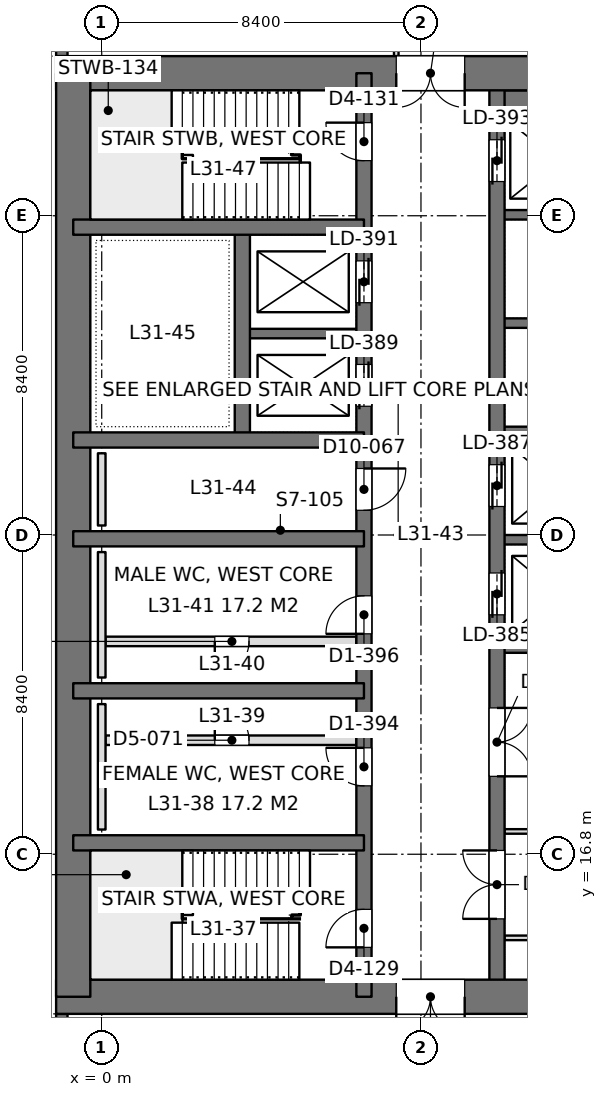
"""IFC4 building model, lengths in metres.
Left out: names, types, materials, properties, quantities, classifications, styles, units other than length and angle.
Written with IfcOpenShell. Run it as: python <this file> out.ifc"""

import sys

from ifc_helpers import new_model, si_unit, direction, frame, frame_2d, origin, place, context, subcontext, project, spatial, rectangle, extrude, element, fill, save


model = new_model("IFC4")
c1 = context("Model", 3, precision=1e-05, world=origin(), true_north=direction((0.0, 1.0)))
c2 = subcontext(c1, "Body", "Model", "MODEL_VIEW")
j1 = project(units=[si_unit("LENGTHUNIT", "METRE"), si_unit("PLANEANGLEUNIT", "RADIAN")], contexts=[c1])
p1 = place(None, origin())
s1 = spatial("IfcSite", under=j1, at=p1, CompositionType="ELEMENT")
p2 = place(p1, origin())
s2 = spatial("IfcBuilding", under=s1, at=p2, CompositionType="ELEMENT")
p3 = place(p2, frame((0.0, 0.0, 138.6)))
s3 = spatial("IfcBuildingStorey", under=s2, at=p3, CompositionType="ELEMENT", Elevation=138.6)
p4 = place(p3, frame((-1.2, 13.05, 0.0), z_axis=(0.0, 0.0, 1.0), x_axis=(1.0, 0.0, 0.0)))
e1 = element("IfcWall", 1, at=p4, inside=s3, PredefinedType="SHEAR", context=c2, shape_type="SweptSolid", body=[
    extrude(rectangle(XDim=18.0, YDim=0.9, at=frame_2d((9.0, 0.0))), origin(), (0.0, 0.0, 1.0), 4.2),
])
p5 = place(p4, frame((8.95, 0.0, 0.0)))
e2 = element("IfcOpeningElement", 2, at=p5, cuts=e1, PredefinedType="OPENING", context=c2, shape_type="SweptSolid", body=[
    extrude(rectangle(XDim=1.8, YDim=2.4, at=frame_2d((0.9, 1.2))), frame((0.0, 0.46, 0.0), z_axis=(0.0, -1.0, 0.0), x_axis=(1.0, 0.0, 0.0)), (0.0, 0.0, 1.0), 0.92),
])
p6 = place(p3, frame((-1.2, 37.35, 0.0), z_axis=(0.0, 0.0, 1.0), x_axis=(1.0, 0.0, 0.0)))
e3 = element("IfcWall", 3, at=p6, inside=s3, PredefinedType="SHEAR", context=c2, shape_type="SweptSolid", body=[
    extrude(rectangle(XDim=18.0, YDim=0.9, at=frame_2d((9.0, 0.0))), origin(), (0.0, 0.0, 1.0), 4.2),
])
p7 = place(p6, frame((8.95, 0.0, 0.0)))
e4 = element("IfcOpeningElement", 4, at=p7, cuts=e3, PredefinedType="OPENING", context=c2, shape_type="SweptSolid", body=[
    extrude(rectangle(XDim=1.8, YDim=2.4, at=frame_2d((0.9, 1.2))), frame((0.0, 0.46, 0.0), z_axis=(0.0, -1.0, 0.0), x_axis=(1.0, 0.0, 0.0)), (0.0, 0.0, 1.0), 0.92),
])
p8 = place(p3, frame((-0.75, 13.05, 0.0), z_axis=(0.0, 0.0, 1.0), x_axis=(0.0, 1.0, 0.0)))
e5 = element("IfcWall", 5, at=p8, inside=s3, PredefinedType="SHEAR", context=c2, shape_type="SweptSolid", body=[
    extrude(rectangle(XDim=24.3, YDim=0.9, at=frame_2d((12.15, 0.0))), origin(), (0.0, 0.0, 1.0), 4.2),
])
p9 = place(p3, frame((6.9, 13.05, 0.0), z_axis=(0.0, 0.0, 1.0), x_axis=(0.0, 1.0, 0.0)))
e6 = element("IfcWall", 6, at=p9, inside=s3, PredefinedType="SHEAR", context=c2, shape_type="SweptSolid", body=[
    extrude(rectangle(XDim=24.3, YDim=0.4, at=frame_2d((12.15, 0.0))), origin(), (0.0, 0.0, 1.0), 4.2),
])
p10 = place(p9, frame((1.3, 0.0, 0.0)))
e7 = element("IfcOpeningElement", 7, at=p10, cuts=e6, PredefinedType="OPENING", context=c2, shape_type="SweptSolid", body=[
    extrude(rectangle(XDim=1.0, YDim=2.2, at=frame_2d((0.5, 1.1))), frame((0.0, 0.21, 0.0), z_axis=(0.0, -1.0, 0.0), x_axis=(1.0, 0.0, 0.0)), (0.0, 0.0, 1.0), 0.42),
])
p11 = place(p9, frame((22.0, 0.0, 0.0)))
e8 = element("IfcOpeningElement", 8, at=p11, cuts=e6, PredefinedType="OPENING", context=c2, shape_type="SweptSolid", body=[
    extrude(rectangle(XDim=1.0, YDim=2.2, at=frame_2d((0.5, 1.1))), frame((0.0, 0.21, 0.0), z_axis=(0.0, -1.0, 0.0), x_axis=(1.0, 0.0, 0.0)), (0.0, 0.0, 1.0), 0.42),
])
p12 = place(p9, frame((5.55, 0.0, 0.0)))
e9 = element("IfcOpeningElement", 9, at=p12, cuts=e6, PredefinedType="OPENING", context=c2, shape_type="SweptSolid", body=[
    extrude(rectangle(XDim=1.0, YDim=2.2, at=frame_2d((0.5, 1.1))), frame((0.0, 0.21, 0.0), z_axis=(0.0, -1.0, 0.0), x_axis=(1.0, 0.0, 0.0)), (0.0, 0.0, 1.0), 0.42),
])
p13 = place(p9, frame((9.55, 0.0, 0.0)))
e10 = element("IfcOpeningElement", 10, at=p13, cuts=e6, PredefinedType="OPENING", context=c2, shape_type="SweptSolid", body=[
    extrude(rectangle(XDim=1.0, YDim=2.2, at=frame_2d((0.5, 1.1))), frame((0.0, 0.21, 0.0), z_axis=(0.0, -1.0, 0.0), x_axis=(1.0, 0.0, 0.0)), (0.0, 0.0, 1.0), 0.42),
])
p14 = place(p9, frame((12.8, 0.0, 0.0)))
e11 = element("IfcOpeningElement", 11, at=p14, cuts=e6, PredefinedType="OPENING", context=c2, shape_type="SweptSolid", body=[
    extrude(rectangle(XDim=1.1, YDim=2.2, at=frame_2d((0.55, 1.1))), frame((0.0, 0.21, 0.0), z_axis=(0.0, -1.0, 0.0), x_axis=(1.0, 0.0, 0.0)), (0.0, 0.0, 1.0), 0.42),
])
p15 = place(p9, frame((15.538, 0.0, 0.0)))
e12 = element("IfcOpeningElement", 12, at=p15, cuts=e6, PredefinedType="OPENING", context=c2, shape_type="SweptSolid", body=[
    extrude(rectangle(XDim=1.1, YDim=2.2, at=frame_2d((0.55, 1.1))), frame((0.0, 0.21, 0.0), z_axis=(0.0, -1.0, 0.0), x_axis=(1.0, 0.0, 0.0)), (0.0, 0.0, 1.0), 0.42),
])
p16 = place(p9, frame((18.262, 0.0, 0.0)))
e13 = element("IfcOpeningElement", 13, at=p16, cuts=e6, PredefinedType="OPENING", context=c2, shape_type="SweptSolid", body=[
    extrude(rectangle(XDim=1.1, YDim=2.2, at=frame_2d((0.55, 1.1))), frame((0.0, 0.21, 0.0), z_axis=(0.0, -1.0, 0.0), x_axis=(1.0, 0.0, 0.0)), (0.0, 0.0, 1.0), 0.42),
])
p17 = place(p3, frame((10.4, 13.05, 0.0), z_axis=(0.0, 0.0, 1.0), x_axis=(0.0, 1.0, 0.0)))
e14 = element("IfcWall", 14, at=p17, inside=s3, PredefinedType="SHEAR", context=c2, shape_type="SweptSolid", body=[
    extrude(rectangle(XDim=24.3, YDim=0.4, at=frame_2d((12.15, 0.0))), origin(), (0.0, 0.0, 1.0), 4.2),
])
p18 = place(p17, frame((10.05, 0.0, 0.0)))
e15 = element("IfcOpeningElement", 15, at=p18, cuts=e14, PredefinedType="OPENING", context=c2, shape_type="SweptSolid", body=[
    extrude(rectangle(XDim=1.1, YDim=2.2, at=frame_2d((0.55, 1.1))), frame((0.0, 0.21, 0.0), z_axis=(0.0, -1.0, 0.0), x_axis=(1.0, 0.0, 0.0)), (0.0, 0.0, 1.0), 0.42),
])
p19 = place(p17, frame((12.9, 0.0, 0.0)))
e16 = element("IfcOpeningElement", 16, at=p19, cuts=e14, PredefinedType="OPENING", context=c2, shape_type="SweptSolid", body=[
    extrude(rectangle(XDim=1.1, YDim=2.2, at=frame_2d((0.55, 1.1))), frame((0.0, 0.21, 0.0), z_axis=(0.0, -1.0, 0.0), x_axis=(1.0, 0.0, 0.0)), (0.0, 0.0, 1.0), 0.42),
])
p20 = place(p17, frame((21.45, 0.0, 0.0)))
e17 = element("IfcOpeningElement", 17, at=p20, cuts=e14, PredefinedType="OPENING", context=c2, shape_type="SweptSolid", body=[
    extrude(rectangle(XDim=1.1, YDim=2.2, at=frame_2d((0.55, 1.1))), frame((0.0, 0.21, 0.0), z_axis=(0.0, -1.0, 0.0), x_axis=(1.0, 0.0, 0.0)), (0.0, 0.0, 1.0), 0.42),
])
p21 = place(p17, frame((2.05, 0.0, 0.0)))
e18 = element("IfcOpeningElement", 18, at=p21, cuts=e14, PredefinedType="OPENING", context=c2, shape_type="SweptSolid", body=[
    extrude(rectangle(XDim=1.8, YDim=2.4, at=frame_2d((0.9, 1.2))), frame((0.0, 0.21, 0.0), z_axis=(0.0, -1.0, 0.0), x_axis=(1.0, 0.0, 0.0)), (0.0, 0.0, 1.0), 0.42),
])
p22 = place(p17, frame((5.8, 0.0, 0.0)))
e19 = element("IfcOpeningElement", 19, at=p22, cuts=e14, PredefinedType="OPENING", context=c2, shape_type="SweptSolid", body=[
    extrude(rectangle(XDim=1.8, YDim=2.4, at=frame_2d((0.9, 1.2))), frame((0.0, 0.21, 0.0), z_axis=(0.0, -1.0, 0.0), x_axis=(1.0, 0.0, 0.0)), (0.0, 0.0, 1.0), 0.42),
])
for number, where, z_axis, x_axis in (
    (20, (-0.75, 17.1, 0.0), (0.0, 0.0, 1.0), (1.0, 0.0, 0.0)),
    (21, (-0.75, 21.1, 0.0), (0.0, 0.0, 1.0), (1.0, 0.0, 0.0)),
    (22, (-0.75, 25.1, 0.0), (0.0, 0.0, 1.0), (1.0, 0.0, 0.0)),
    (23, (-0.75, 27.7, 0.0), (0.0, 0.0, 1.0), (1.0, 0.0, 0.0)),
    (24, (-0.75, 33.3, 0.0), (0.0, 0.0, 1.0), (1.0, 0.0, 0.0)),
):
    element("IfcWall", number, at=place(p3, frame(where, z_axis=z_axis, x_axis=x_axis)), inside=s3, PredefinedType="SHEAR", context=c2, shape_type="SweptSolid", body=[
        extrude(rectangle(XDim=7.65, YDim=0.4, at=frame_2d((3.825, 0.0))), origin(), (0.0, 0.0, 1.0), 4.2),
    ])
p23 = place(p3, frame((3.7, 27.7, 0.0), z_axis=(0.0, 0.0, 1.0), x_axis=(0.0, 1.0, 0.0)))
e25 = element("IfcWall", 25, at=p23, inside=s3, PredefinedType="SHEAR", context=c2, shape_type="SweptSolid", body=[
    extrude(rectangle(XDim=5.6, YDim=0.4, at=frame_2d((2.8, 0.0))), origin(), (0.0, 0.0, 1.0), 4.2),
])
p24 = place(p3, frame((3.7, 30.5, 0.0), z_axis=(0.0, 0.0, 1.0), x_axis=(1.0, 0.0, 0.0)))
e26 = element("IfcWall", 26, at=p24, inside=s3, PredefinedType="SHEAR", context=c2, shape_type="SweptSolid", body=[
    extrude(rectangle(XDim=3.2, YDim=0.25, at=frame_2d((1.6, 0.0))), origin(), (0.0, 0.0, 1.0), 4.2),
])
p25 = place(p3, frame((10.4, 22.225, 0.0), z_axis=(0.0, 0.0, 1.0), x_axis=(1.0, 0.0, 0.0)))
e27 = element("IfcWall", 27, at=p25, inside=s3, PredefinedType="SHEAR", context=c2, shape_type="SweptSolid", body=[
    extrude(rectangle(XDim=5.95, YDim=0.25, at=frame_2d((2.975, 0.0))), origin(), (0.0, 0.0, 1.0), 4.2),
])
for number, where, z_axis, x_axis in (
    (28, (10.4, 25.075, 0.0), (0.0, 0.0, 1.0), (1.0, 0.0, 0.0)),
    (29, (10.4, 27.925, 0.0), (0.0, 0.0, 1.0), (1.0, 0.0, 0.0)),
    (30, (10.4, 30.775, 0.0), (0.0, 0.0, 1.0), (1.0, 0.0, 0.0)),
    (31, (10.4, 33.625, 0.0), (0.0, 0.0, 1.0), (1.0, 0.0, 0.0)),
):
    element("IfcWall", number, at=place(p3, frame(where, z_axis=z_axis, x_axis=x_axis)), inside=s3, PredefinedType="SHEAR", context=c2, shape_type="SweptSolid", body=[
        extrude(rectangle(XDim=3.2, YDim=0.25, at=frame_2d((1.6, 0.0))), origin(), (0.0, 0.0, 1.0), 4.2),
    ])
p26 = place(p3, frame((10.4, 36.625, 0.0), z_axis=(0.0, 0.0, 1.0), x_axis=(1.0, 0.0, 0.0)))
e32 = element("IfcWall", 32, at=p26, inside=s3, PredefinedType="SHEAR", context=c2, shape_type="SweptSolid", body=[
    extrude(rectangle(XDim=3.2, YDim=0.55, at=frame_2d((1.6, 0.0))), origin(), (0.0, 0.0, 1.0), 4.2),
])
p27 = place(p3, frame((-1.05, 8.4, 0.0), z_axis=(0.0, 0.0, 1.0), x_axis=(0.0, 1.0, 0.0)))
e33 = element("IfcWall", 33, at=p27, inside=s3, PredefinedType="SOLIDWALL", context=c2, shape_type="SweptSolid", body=[
    extrude(rectangle(XDim=4.2, YDim=0.3, at=frame_2d((2.1, 0.0))), origin(), (0.0, 0.0, 1.0), 4.05),
])
p28 = place(p27, frame((0.9, 0.0, 0.9)))
e34 = element("IfcOpeningElement", 34, at=p28, cuts=e33, PredefinedType="OPENING", context=c2, shape_type="SweptSolid", body=[
    extrude(rectangle(XDim=2.4, YDim=1.9, at=frame_2d((1.2, 0.95))), frame((0.0, 0.16, 0.0), z_axis=(0.0, -1.0, 0.0), x_axis=(1.0, 0.0, 0.0)), (0.0, 0.0, 1.0), 0.32),
])
p29 = place(p3, frame((-1.05, 37.8, 0.0), z_axis=(0.0, 0.0, 1.0), x_axis=(0.0, 1.0, 0.0)))
e35 = element("IfcWall", 35, at=p29, inside=s3, PredefinedType="SOLIDWALL", context=c2, shape_type="SweptSolid", body=[
    extrude(rectangle(XDim=4.2, YDim=0.3, at=frame_2d((2.1, 0.0))), origin(), (0.0, 0.0, 1.0), 4.05),
])
p30 = place(p29, frame((0.9, 0.0, 0.9)))
e36 = element("IfcOpeningElement", 36, at=p30, cuts=e35, PredefinedType="OPENING", context=c2, shape_type="SweptSolid", body=[
    extrude(rectangle(XDim=2.4, YDim=1.9, at=frame_2d((1.2, 0.95))), frame((0.0, 0.16, 0.0), z_axis=(0.0, -1.0, 0.0), x_axis=(1.0, 0.0, 0.0)), (0.0, 0.0, 1.0), 0.32),
])
p31 = place(p3, frame((10.598, 17.4, 0.0), z_axis=(0.0, 0.0, 1.0), x_axis=(1.0, 0.0, 0.0)))
e37 = element("IfcWall", 37, at=p31, inside=s3, PredefinedType="PARTITIONING", context=c2, shape_type="SweptSolid", body=[
    extrude(rectangle(XDim=5.904, YDim=0.12, at=frame_2d((2.952, 0.0))), origin(), (0.0, 0.0, 1.0), 3.55),
])
p32 = place(p3, frame((10.598, 14.6, 0.0), z_axis=(0.0, 0.0, 1.0), x_axis=(1.0, 0.0, 0.0)))
e38 = element("IfcWall", 38, at=p32, inside=s3, PredefinedType="PARTITIONING", context=c2, shape_type="SweptSolid", body=[
    extrude(rectangle(XDim=6.204, YDim=0.12, at=frame_2d((3.102, 0.0))), origin(), (0.0, 0.0, 1.0), 3.55),
])
p33 = place(p3, frame((7.75, 37.8, 0.0), z_axis=(0.0, 0.0, 1.0), x_axis=(0.0, 1.0, 0.0)))
e39 = element("IfcWall", 39, at=p33, inside=s3, PredefinedType="PARTITIONING", context=c2, shape_type="SweptSolid", body=[
    extrude(rectangle(XDim=2.0, YDim=0.12, at=frame_2d((1.0, 0.0))), origin(), (0.0, 0.0, 1.0), 4.05),
])
p34 = place(p3, frame((0.1, 22.4, 0.0), z_axis=(0.0, 0.0, 1.0), x_axis=(1.0, 0.0, 0.0)))
e40 = element("IfcWall", 40, at=p34, inside=s3, PredefinedType="PARTITIONING", context=c2, shape_type="SweptSolid", body=[
    extrude(rectangle(XDim=6.6, YDim=0.25, at=frame_2d((3.3, 0.0))), origin(), (0.0, 0.0, 1.0), 4.0),
])
p35 = place(p34, frame((2.875, 0.0, 0.0)))
e41 = element("IfcOpeningElement", 41, at=p35, cuts=e40, PredefinedType="OPENING", context=c2, shape_type="SweptSolid", body=[
    extrude(rectangle(XDim=0.9, YDim=2.2, at=frame_2d((0.45, 1.1))), frame((0.0, 0.135, 0.0), z_axis=(0.0, -1.0, 0.0), x_axis=(1.0, 0.0, 0.0)), (0.0, 0.0, 1.0), 0.27),
])
p36 = place(p3, frame((0.1, 19.8, 0.0), z_axis=(0.0, 0.0, 1.0), x_axis=(1.0, 0.0, 0.0)))
e42 = element("IfcWall", 42, at=p36, inside=s3, PredefinedType="PARTITIONING", context=c2, shape_type="SweptSolid", body=[
    extrude(rectangle(XDim=6.6, YDim=0.25, at=frame_2d((3.3, 0.0))), origin(), (0.0, 0.0, 1.0), 4.0),
])
p37 = place(p36, frame((2.875, 0.0, 0.0)))
e43 = element("IfcOpeningElement", 43, at=p37, cuts=e42, PredefinedType="OPENING", context=c2, shape_type="SweptSolid", body=[
    extrude(rectangle(XDim=0.9, YDim=2.2, at=frame_2d((0.45, 1.1))), frame((0.0, 0.135, 0.0), z_axis=(0.0, -1.0, 0.0), x_axis=(1.0, 0.0, 0.0)), (0.0, 0.0, 1.0), 0.27),
])
for number, where, z_axis, x_axis in (
    (44, (0.0, 17.45, 0.0), (0.0, 0.0, 1.0), (0.0, 1.0, 0.0)),
    (45, (0.0, 21.45, 0.0), (0.0, 0.0, 1.0), (0.0, 1.0, 0.0)),
):
    element("IfcWall", number, at=place(p3, frame(where, z_axis=z_axis, x_axis=x_axis)), inside=s3, PredefinedType="PLUMBINGWALL", context=c2, shape_type="SweptSolid", body=[
        extrude(rectangle(XDim=3.3, YDim=0.2, at=frame_2d((1.65, 0.0))), origin(), (0.0, 0.0, 1.0), 1.2),
    ])
p38 = place(p3, frame((0.0, 25.45, 0.0), z_axis=(0.0, 0.0, 1.0), x_axis=(0.0, 1.0, 0.0)))
e46 = element("IfcWall", 46, at=p38, inside=s3, PredefinedType="PLUMBINGWALL", context=c2, shape_type="SweptSolid", body=[
    extrude(rectangle(XDim=1.9, YDim=0.2, at=frame_2d((0.95, 0.0))), origin(), (0.0, 0.0, 1.0), 1.2),
])
p39 = place(p5, frame((1.8, 0.0, 0.0), z_axis=(0.0, 0.0, 1.0), x_axis=(-1.0, 0.0, 0.0)))
e47 = element("IfcDoor", 47, at=p39, inside=s3, OperationType="DOUBLE_DOOR_SINGLE_SWING", PredefinedType="DOOR", context=c2, shape_type="SweptSolid", body=[
    extrude(rectangle(XDim=1.8, YDim=2.4, at=frame_2d((0.9, 1.2))), frame((0.0, 0.025, 0.0), z_axis=(0.0, -1.0, 0.0), x_axis=(1.0, 0.0, 0.0)), (0.0, 0.0, 1.0), 0.05),
])
fill(e2, e47)
p40 = place(p7, frame((1.8, 0.0, 0.0), z_axis=(0.0, 0.0, 1.0), x_axis=(-1.0, 0.0, 0.0)))
e48 = element("IfcDoor", 48, at=p40, inside=s3, OperationType="DOUBLE_DOOR_SINGLE_SWING", PredefinedType="DOOR", context=c2, shape_type="SweptSolid", body=[
    extrude(rectangle(XDim=1.8, YDim=2.4, at=frame_2d((0.9, 1.2))), frame((0.0, 0.025, 0.0), z_axis=(0.0, -1.0, 0.0), x_axis=(1.0, 0.0, 0.0)), (0.0, 0.0, 1.0), 0.05),
])
fill(e4, e48)
p41 = place(p10, origin())
e49 = element("IfcDoor", 49, at=p41, inside=s3, OperationType="SINGLE_SWING_LEFT", PredefinedType="DOOR", context=c2, shape_type="SweptSolid", body=[
    extrude(rectangle(XDim=1.0, YDim=2.2, at=frame_2d((0.5, 1.1))), frame((0.0, 0.025, 0.0), z_axis=(0.0, -1.0, 0.0), x_axis=(1.0, 0.0, 0.0)), (0.0, 0.0, 1.0), 0.05),
])
fill(e7, e49)
p42 = place(p11, origin())
e50 = element("IfcDoor", 50, at=p42, inside=s3, OperationType="SINGLE_SWING_RIGHT", PredefinedType="DOOR", context=c2, shape_type="SweptSolid", body=[
    extrude(rectangle(XDim=1.0, YDim=2.2, at=frame_2d((0.5, 1.1))), frame((0.0, 0.025, 0.0), z_axis=(0.0, -1.0, 0.0), x_axis=(1.0, 0.0, 0.0)), (0.0, 0.0, 1.0), 0.05),
])
fill(e8, e50)
p43 = place(p12, origin())
e51 = element("IfcDoor", 51, at=p43, inside=s3, OperationType="SINGLE_SWING_RIGHT", PredefinedType="DOOR", context=c2, shape_type="SweptSolid", body=[
    extrude(rectangle(XDim=1.0, YDim=2.2, at=frame_2d((0.5, 1.1))), frame((0.0, 0.025, 0.0), z_axis=(0.0, -1.0, 0.0), x_axis=(1.0, 0.0, 0.0)), (0.0, 0.0, 1.0), 0.05),
])
fill(e9, e51)
p44 = place(p13, origin())
e52 = element("IfcDoor", 52, at=p44, inside=s3, OperationType="SINGLE_SWING_LEFT", PredefinedType="DOOR", context=c2, shape_type="SweptSolid", body=[
    extrude(rectangle(XDim=1.0, YDim=2.2, at=frame_2d((0.5, 1.1))), frame((0.0, 0.025, 0.0), z_axis=(0.0, -1.0, 0.0), x_axis=(1.0, 0.0, 0.0)), (0.0, 0.0, 1.0), 0.05),
])
fill(e10, e52)
p45 = place(p14, frame((1.1, 0.0, 0.0), z_axis=(0.0, 0.0, 1.0), x_axis=(-1.0, 0.0, 0.0)))
e53 = element("IfcDoor", 53, at=p45, inside=s3, OperationType="SINGLE_SWING_LEFT", PredefinedType="DOOR", context=c2, shape_type="SweptSolid", body=[
    extrude(rectangle(XDim=1.1, YDim=2.2, at=frame_2d((0.55, 1.1))), frame((0.0, 0.025, 0.0), z_axis=(0.0, -1.0, 0.0), x_axis=(1.0, 0.0, 0.0)), (0.0, 0.0, 1.0), 0.05),
])
fill(e11, e53)
p46 = place(p18, origin())
e54 = element("IfcDoor", 54, at=p46, inside=s3, OperationType="DOUBLE_DOOR_SLIDING", PredefinedType="DOOR", context=c2, shape_type="SweptSolid", body=[
    extrude(rectangle(XDim=1.1, YDim=2.2, at=frame_2d((0.55, 1.1))), frame((0.0, 0.025, 0.0), z_axis=(0.0, -1.0, 0.0), x_axis=(1.0, 0.0, 0.0)), (0.0, 0.0, 1.0), 0.05),
])
fill(e15, e54)
p47 = place(p19, origin())
e55 = element("IfcDoor", 55, at=p47, inside=s3, OperationType="DOUBLE_DOOR_SLIDING", PredefinedType="DOOR", context=c2, shape_type="SweptSolid", body=[
    extrude(rectangle(XDim=1.1, YDim=2.2, at=frame_2d((0.55, 1.1))), frame((0.0, 0.025, 0.0), z_axis=(0.0, -1.0, 0.0), x_axis=(1.0, 0.0, 0.0)), (0.0, 0.0, 1.0), 0.05),
])
fill(e16, e55)
p48 = place(p20, origin())
e56 = element("IfcDoor", 56, at=p48, inside=s3, OperationType="DOUBLE_DOOR_SLIDING", PredefinedType="DOOR", context=c2, shape_type="SweptSolid", body=[
    extrude(rectangle(XDim=1.1, YDim=2.2, at=frame_2d((0.55, 1.1))), frame((0.0, 0.025, 0.0), z_axis=(0.0, -1.0, 0.0), x_axis=(1.0, 0.0, 0.0)), (0.0, 0.0, 1.0), 0.05),
])
fill(e17, e56)
p49 = place(p15, origin())
e57 = element("IfcDoor", 57, at=p49, inside=s3, OperationType="DOUBLE_DOOR_SLIDING", PredefinedType="DOOR", context=c2, shape_type="SweptSolid", body=[
    extrude(rectangle(XDim=1.1, YDim=2.2, at=frame_2d((0.55, 1.1))), frame((0.0, 0.025, 0.0), z_axis=(0.0, -1.0, 0.0), x_axis=(1.0, 0.0, 0.0)), (0.0, 0.0, 1.0), 0.05),
])
fill(e12, e57)
p50 = place(p16, origin())
e58 = element("IfcDoor", 58, at=p50, inside=s3, OperationType="DOUBLE_DOOR_SLIDING", PredefinedType="DOOR", context=c2, shape_type="SweptSolid", body=[
    extrude(rectangle(XDim=1.1, YDim=2.2, at=frame_2d((0.55, 1.1))), frame((0.0, 0.025, 0.0), z_axis=(0.0, -1.0, 0.0), x_axis=(1.0, 0.0, 0.0)), (0.0, 0.0, 1.0), 0.05),
])
fill(e13, e58)
p51 = place(p21, origin())
e59 = element("IfcDoor", 59, at=p51, inside=s3, OperationType="DOUBLE_DOOR_SINGLE_SWING", PredefinedType="DOOR", context=c2, shape_type="SweptSolid", body=[
    extrude(rectangle(XDim=1.8, YDim=2.4, at=frame_2d((0.9, 1.2))), frame((0.0, 0.025, 0.0), z_axis=(0.0, -1.0, 0.0), x_axis=(1.0, 0.0, 0.0)), (0.0, 0.0, 1.0), 0.05),
])
fill(e18, e59)
p52 = place(p22, frame((1.8, 0.0, 0.0), z_axis=(0.0, 0.0, 1.0), x_axis=(-1.0, 0.0, 0.0)))
e60 = element("IfcDoor", 60, at=p52, inside=s3, OperationType="DOUBLE_DOOR_SINGLE_SWING", PredefinedType="DOOR", context=c2, shape_type="SweptSolid", body=[
    extrude(rectangle(XDim=1.8, YDim=2.4, at=frame_2d((0.9, 1.2))), frame((0.0, 0.025, 0.0), z_axis=(0.0, -1.0, 0.0), x_axis=(1.0, 0.0, 0.0)), (0.0, 0.0, 1.0), 0.05),
])
fill(e19, e60)
p53 = place(p35, frame((0.9, 0.0, 0.0), z_axis=(0.0, 0.0, 1.0), x_axis=(-1.0, 0.0, 0.0)))
e61 = element("IfcDoor", 61, at=p53, inside=s3, OperationType="SINGLE_SWING_RIGHT", PredefinedType="DOOR", context=c2, shape_type="SweptSolid", body=[
    extrude(rectangle(XDim=0.9, YDim=2.2, at=frame_2d((0.45, 1.1))), frame((0.0, 0.025, 0.0), z_axis=(0.0, -1.0, 0.0), x_axis=(1.0, 0.0, 0.0)), (0.0, 0.0, 1.0), 0.05),
])
fill(e41, e61)
p54 = place(p37, origin())
e62 = element("IfcDoor", 62, at=p54, inside=s3, OperationType="SINGLE_SWING_LEFT", PredefinedType="DOOR", context=c2, shape_type="SweptSolid", body=[
    extrude(rectangle(XDim=0.9, YDim=2.2, at=frame_2d((0.45, 1.1))), frame((0.0, 0.025, 0.0), z_axis=(0.0, -1.0, 0.0), x_axis=(1.0, 0.0, 0.0)), (0.0, 0.0, 1.0), 0.05),
])
fill(e43, e62)
save(model, sys.argv[1])
